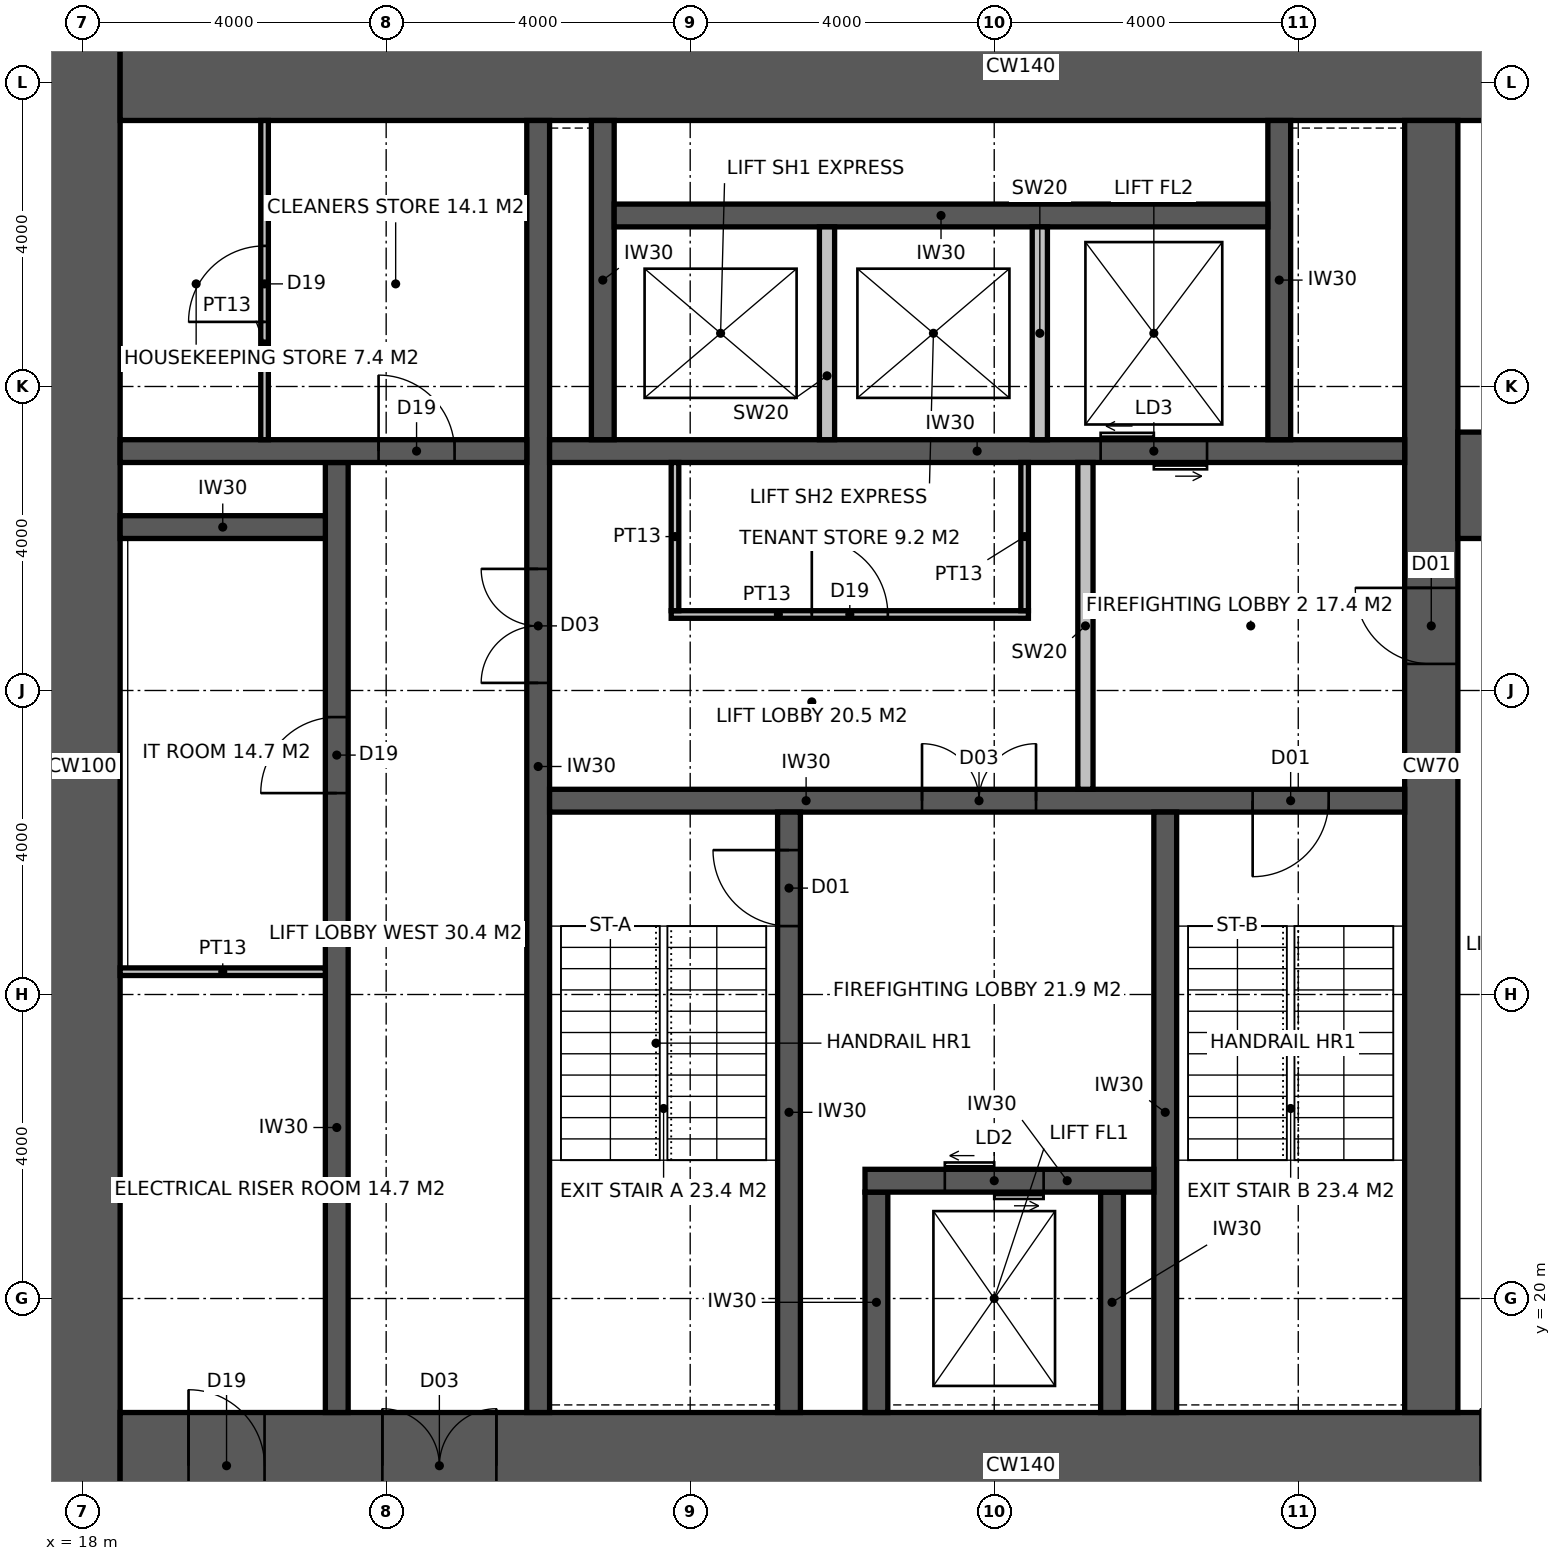
"""IFC4 building model, lengths in metres.
Left out: names, types, materials, properties, quantities, classifications, styles, units other than length and angle.
Written with IfcOpenShell. Run it as: python <this file> out.ifc"""

import sys

from ifc_helpers import new_model, si_unit, direction, frame, frame_2d, origin, place, context, subcontext, project, spatial, rectangle, extrude, element, fill, save


model = new_model("IFC4")
c1 = context("Model", 3, precision=1e-05, world=origin(), true_north=direction((0.0, 1.0)))
c2 = subcontext(c1, "Body", "Model", "MODEL_VIEW")
j1 = project(units=[si_unit("LENGTHUNIT", "METRE"), si_unit("PLANEANGLEUNIT", "RADIAN")], contexts=[c1])
p1 = place(None, origin())
s1 = spatial("IfcSite", under=j1, at=p1, CompositionType="ELEMENT")
p2 = place(p1, origin())
s2 = spatial("IfcBuilding", under=s1, at=p2, CompositionType="ELEMENT")
p3 = place(p2, frame((0.0, 0.0, 63.0)))
s3 = spatial("IfcBuildingStorey", under=s2, at=p3, CompositionType="ELEMENT", Elevation=63.0)
p4 = place(p3, frame((18.0, 17.1, -0.15), z_axis=(0.0, 0.0, 1.0), x_axis=(0.0, 1.0, 0.0)))
e1 = element("IfcWall", 1, at=p4, inside=s3, PredefinedType="SHEAR", context=c2, shape_type="SweptSolid", body=[
    extrude(rectangle(XDim=19.8, YDim=1.0, at=frame_2d((9.9, 0.0))), origin(), (0.0, 0.0, 1.0), 4.0),
])
p5 = place(p3, frame((18.5, 17.8, -0.15), z_axis=(0.0, 0.0, 1.0), x_axis=(1.0, 0.0, 0.0)))
e2 = element("IfcWall", 2, at=p5, inside=s3, PredefinedType="SHEAR", context=c2, shape_type="SweptSolid", body=[
    extrude(rectangle(XDim=23.7, YDim=1.4, at=frame_2d((11.85, 0.0))), origin(), (0.0, 0.0, 1.0), 4.0),
])
p6 = place(p5, frame((3.45, 0.0, 0.15)))
e3 = element("IfcOpeningElement", 3, at=p6, cuts=e2, PredefinedType="OPENING", context=c2, shape_type="SweptSolid", body=[
    extrude(rectangle(XDim=1.5, YDim=2.4, at=frame_2d((0.75, 1.2))), frame((0.0, 0.71, 0.0), z_axis=(0.0, -1.0, 0.0), x_axis=(1.0, 0.0, 0.0)), (0.0, 0.0, 1.0), 1.42),
])
p7 = place(p5, frame((17.9, 0.0, 0.15)))
e4 = element("IfcOpeningElement", 4, at=p7, cuts=e2, PredefinedType="OPENING", context=c2, shape_type="SweptSolid", body=[
    extrude(rectangle(XDim=1.5, YDim=2.4, at=frame_2d((0.75, 1.2))), frame((0.0, 0.71, 0.0), z_axis=(0.0, -1.0, 0.0), x_axis=(1.0, 0.0, 0.0)), (0.0, 0.0, 1.0), 1.42),
])
p8 = place(p5, frame((0.9, 0.0, 0.15)))
e5 = element("IfcOpeningElement", 5, at=p8, cuts=e2, PredefinedType="OPENING", context=c2, shape_type="SweptSolid", body=[
    extrude(rectangle(XDim=1.0, YDim=2.2, at=frame_2d((0.5, 1.1))), frame((0.0, 0.71, 0.0), z_axis=(0.0, -1.0, 0.0), x_axis=(1.0, 0.0, 0.0)), (0.0, 0.0, 1.0), 1.42),
])
p9 = place(p3, frame((18.5, 36.2, -0.15), z_axis=(0.0, 0.0, 1.0), x_axis=(1.0, 0.0, 0.0)))
e6 = element("IfcWall", 6, at=p9, inside=s3, PredefinedType="SHEAR", context=c2, shape_type="SweptSolid", body=[
    extrude(rectangle(XDim=23.7, YDim=1.4, at=frame_2d((11.85, 0.0))), origin(), (0.0, 0.0, 1.0), 4.0),
])
p10 = place(p3, frame((35.75, 18.5, -0.15), z_axis=(0.0, 0.0, 1.0), x_axis=(0.0, 1.0, 0.0)))
e7 = element("IfcWall", 7, at=p10, inside=s3, PredefinedType="SHEAR", context=c2, shape_type="SweptSolid", body=[
    extrude(rectangle(XDim=17.0, YDim=0.7, at=frame_2d((8.5, 0.0))), origin(), (0.0, 0.0, 1.0), 4.0),
])
p11 = place(p10, frame((9.85, 0.0, 0.15)))
e8 = element("IfcOpeningElement", 8, at=p11, cuts=e7, PredefinedType="OPENING", context=c2, shape_type="SweptSolid", body=[
    extrude(rectangle(XDim=1.0, YDim=2.2, at=frame_2d((0.5, 1.1))), frame((0.0, 0.36, 0.0), z_axis=(0.0, -1.0, 0.0), x_axis=(1.0, 0.0, 0.0)), (0.0, 0.0, 1.0), 0.72),
])
p12 = place(p3, frame((24.0, 18.5, -0.15), z_axis=(0.0, 0.0, 1.0), x_axis=(0.0, 1.0, 0.0)))
e9 = element("IfcWall", 9, at=p12, inside=s3, PredefinedType="SHEAR", context=c2, shape_type="SweptSolid", body=[
    extrude(rectangle(XDim=17.0, YDim=0.3, at=frame_2d((8.5, 0.0))), origin(), (0.0, 0.0, 1.0), 4.0),
])
p13 = place(p12, frame((9.6, 0.0, 0.15)))
e10 = element("IfcOpeningElement", 10, at=p13, cuts=e9, PredefinedType="OPENING", context=c2, shape_type="SweptSolid", body=[
    extrude(rectangle(XDim=1.5, YDim=2.4, at=frame_2d((0.75, 1.2))), frame((0.0, 0.16, 0.0), z_axis=(0.0, -1.0, 0.0), x_axis=(1.0, 0.0, 0.0)), (0.0, 0.0, 1.0), 0.32),
])
p14 = place(p3, frame((24.15, 26.55, -0.15), z_axis=(0.0, 0.0, 1.0), x_axis=(1.0, 0.0, 0.0)))
e11 = element("IfcWall", 11, at=p14, inside=s3, PredefinedType="SHEAR", context=c2, shape_type="SweptSolid", body=[
    extrude(rectangle(XDim=11.25, YDim=0.3, at=frame_2d((5.625, 0.0))), origin(), (0.0, 0.0, 1.0), 4.0),
])
p15 = place(p14, frame((9.25, 0.0, 0.15)))
e12 = element("IfcOpeningElement", 12, at=p15, cuts=e11, PredefinedType="OPENING", context=c2, shape_type="SweptSolid", body=[
    extrude(rectangle(XDim=1.0, YDim=2.2, at=frame_2d((0.5, 1.1))), frame((0.0, 0.16, 0.0), z_axis=(0.0, -1.0, 0.0), x_axis=(1.0, 0.0, 0.0)), (0.0, 0.0, 1.0), 0.32),
])
p16 = place(p14, frame((4.9, 0.0, 0.15)))
e13 = element("IfcOpeningElement", 13, at=p16, cuts=e11, PredefinedType="OPENING", context=c2, shape_type="SweptSolid", body=[
    extrude(rectangle(XDim=1.5, YDim=2.4, at=frame_2d((0.75, 1.2))), frame((0.0, 0.16, 0.0), z_axis=(0.0, -1.0, 0.0), x_axis=(1.0, 0.0, 0.0)), (0.0, 0.0, 1.0), 0.32),
])
p17 = place(p3, frame((27.3, 18.5, -0.15), z_axis=(0.0, 0.0, 1.0), x_axis=(0.0, 1.0, 0.0)))
e14 = element("IfcWall", 14, at=p17, inside=s3, PredefinedType="SHEAR", context=c2, shape_type="SweptSolid", body=[
    extrude(rectangle(XDim=7.9, YDim=0.3, at=frame_2d((3.95, 0.0))), origin(), (0.0, 0.0, 1.0), 4.0),
])
p18 = place(p17, frame((6.4, 0.0, 0.15)))
e15 = element("IfcOpeningElement", 15, at=p18, cuts=e14, PredefinedType="OPENING", context=c2, shape_type="SweptSolid", body=[
    extrude(rectangle(XDim=1.0, YDim=2.2, at=frame_2d((0.5, 1.1))), frame((0.0, 0.16, 0.0), z_axis=(0.0, -1.0, 0.0), x_axis=(1.0, 0.0, 0.0)), (0.0, 0.0, 1.0), 0.32),
])
p19 = place(p3, frame((32.25, 18.5, -0.15), z_axis=(0.0, 0.0, 1.0), x_axis=(0.0, 1.0, 0.0)))
e16 = element("IfcWall", 16, at=p19, inside=s3, PredefinedType="SHEAR", context=c2, shape_type="SweptSolid", body=[
    extrude(rectangle(XDim=7.9, YDim=0.3, at=frame_2d((3.95, 0.0))), origin(), (0.0, 0.0, 1.0), 4.0),
])
for number, where, z_axis, x_axis in (
    (17, (28.45, 18.5, -0.15), (0.0, 0.0, 1.0), (0.0, 1.0, 0.0)),
    (18, (31.55, 18.5, -0.15), (0.0, 0.0, 1.0), (0.0, 1.0, 0.0)),
):
    element("IfcWall", number, at=place(p3, frame(where, z_axis=z_axis, x_axis=x_axis)), inside=s3, PredefinedType="SHEAR", context=c2, shape_type="SweptSolid", body=[
        extrude(rectangle(XDim=2.9, YDim=0.3, at=frame_2d((1.45, 0.0))), origin(), (0.0, 0.0, 1.0), 4.0),
    ])
p20 = place(p3, frame((28.3, 21.55, -0.15), z_axis=(0.0, 0.0, 1.0), x_axis=(1.0, 0.0, 0.0)))
e19 = element("IfcWall", 19, at=p20, inside=s3, PredefinedType="SHEAR", context=c2, shape_type="SweptSolid", body=[
    extrude(rectangle(XDim=3.8, YDim=0.3, at=frame_2d((1.9, 0.0))), origin(), (0.0, 0.0, 1.0), 4.0),
])
p21 = place(p20, frame((1.05, 0.0, 0.15)))
e20 = element("IfcOpeningElement", 20, at=p21, cuts=e19, PredefinedType="OPENING", context=c2, shape_type="SweptSolid", body=[
    extrude(rectangle(XDim=1.3, YDim=2.4, at=frame_2d((0.65, 1.2))), frame((0.0, 0.16, 0.0), z_axis=(0.0, -1.0, 0.0), x_axis=(1.0, 0.0, 0.0)), (0.0, 0.0, 1.0), 0.32),
])
p22 = place(p3, frame((24.15, 31.15, -0.15), z_axis=(0.0, 0.0, 1.0), x_axis=(1.0, 0.0, 0.0)))
e21 = element("IfcWall", 21, at=p22, inside=s3, PredefinedType="SHEAR", context=c2, shape_type="SweptSolid", body=[
    extrude(rectangle(XDim=11.25, YDim=0.3, at=frame_2d((5.625, 0.0))), origin(), (0.0, 0.0, 1.0), 4.0),
])
p23 = place(p22, frame((7.25, 0.0, 0.15)))
e22 = element("IfcOpeningElement", 22, at=p23, cuts=e21, PredefinedType="OPENING", context=c2, shape_type="SweptSolid", body=[
    extrude(rectangle(XDim=1.4, YDim=2.4, at=frame_2d((0.7, 1.2))), frame((0.0, 0.16, 0.0), z_axis=(0.0, -1.0, 0.0), x_axis=(1.0, 0.0, 0.0)), (0.0, 0.0, 1.0), 0.32),
])
p24 = place(p3, frame((21.35, 18.5, -0.15), z_axis=(0.0, 0.0, 1.0), x_axis=(0.0, 1.0, 0.0)))
e23 = element("IfcWall", 23, at=p24, inside=s3, PredefinedType="SHEAR", context=c2, shape_type="SweptSolid", body=[
    extrude(rectangle(XDim=12.5, YDim=0.3, at=frame_2d((6.25, 0.0))), origin(), (0.0, 0.0, 1.0), 4.0),
])
p25 = place(p24, frame((8.15, 0.0, 0.15)))
e24 = element("IfcOpeningElement", 24, at=p25, cuts=e23, PredefinedType="OPENING", context=c2, shape_type="SweptSolid", body=[
    extrude(rectangle(XDim=1.0, YDim=2.2, at=frame_2d((0.5, 1.1))), frame((0.0, 0.16, 0.0), z_axis=(0.0, -1.0, 0.0), x_axis=(1.0, 0.0, 0.0)), (0.0, 0.0, 1.0), 0.32),
])
p26 = place(p3, frame((18.5, 31.15, -0.15), z_axis=(0.0, 0.0, 1.0), x_axis=(1.0, 0.0, 0.0)))
e25 = element("IfcWall", 25, at=p26, inside=s3, PredefinedType="SHEAR", context=c2, shape_type="SweptSolid", body=[
    extrude(rectangle(XDim=5.35, YDim=0.3, at=frame_2d((2.675, 0.0))), origin(), (0.0, 0.0, 1.0), 4.0),
])
p27 = place(p26, frame((3.4, 0.0, 0.15)))
e26 = element("IfcOpeningElement", 26, at=p27, cuts=e25, PredefinedType="OPENING", context=c2, shape_type="SweptSolid", body=[
    extrude(rectangle(XDim=1.0, YDim=2.2, at=frame_2d((0.5, 1.1))), frame((0.0, 0.16, 0.0), z_axis=(0.0, -1.0, 0.0), x_axis=(1.0, 0.0, 0.0)), (0.0, 0.0, 1.0), 0.32),
])
p28 = place(p3, frame((18.5, 30.15, -0.15), z_axis=(0.0, 0.0, 1.0), x_axis=(1.0, 0.0, 0.0)))
e27 = element("IfcWall", 27, at=p28, inside=s3, PredefinedType="SHEAR", context=c2, shape_type="SweptSolid", body=[
    extrude(rectangle(XDim=2.7, YDim=0.3, at=frame_2d((1.35, 0.0))), origin(), (0.0, 0.0, 1.0), 4.0),
])
for number, where, z_axis, x_axis in (
    (28, (24.85, 31.3, -0.15), (0.0, 0.0, 1.0), (0.0, 1.0, 0.0)),
    (29, (33.75, 31.3, -0.15), (0.0, 0.0, 1.0), (0.0, 1.0, 0.0)),
):
    element("IfcWall", number, at=place(p3, frame(where, z_axis=z_axis, x_axis=x_axis)), inside=s3, PredefinedType="SHEAR", context=c2, shape_type="SweptSolid", body=[
        extrude(rectangle(XDim=4.2, YDim=0.3, at=frame_2d((2.1, 0.0))), origin(), (0.0, 0.0, 1.0), 4.0),
    ])
p29 = place(p3, frame((25.0, 34.25, -0.15), z_axis=(0.0, 0.0, 1.0), x_axis=(1.0, 0.0, 0.0)))
e30 = element("IfcWall", 30, at=p29, inside=s3, PredefinedType="SHEAR", context=c2, shape_type="SweptSolid", body=[
    extrude(rectangle(XDim=8.6, YDim=0.3, at=frame_2d((4.3, 0.0))), origin(), (0.0, 0.0, 1.0), 4.0),
])
for number, where, z_axis, x_axis in (
    (31, (27.8, 31.3, -0.15), (0.0, 0.0, 1.0), (0.0, 1.0, 0.0)),
    (32, (30.6, 31.3, -0.15), (0.0, 0.0, 1.0), (0.0, 1.0, 0.0)),
):
    element("IfcWall", number, at=place(p3, frame(where, z_axis=z_axis, x_axis=x_axis)), inside=s3, PredefinedType="SOLIDWALL", context=c2, shape_type="SweptSolid", body=[
        extrude(rectangle(XDim=2.8, YDim=0.2, at=frame_2d((1.4, 0.0))), origin(), (0.0, 0.0, 1.0), 4.0),
    ])
p30 = place(p3, frame((36.1, 30.7, -0.15), z_axis=(0.0, 0.0, 1.0), x_axis=(1.0, 0.0, 0.0)))
e33 = element("IfcWall", 33, at=p30, inside=s3, PredefinedType="SHEAR", context=c2, shape_type="SweptSolid", body=[
    extrude(rectangle(XDim=6.1, YDim=1.4, at=frame_2d((3.05, 0.0))), origin(), (0.0, 0.0, 1.0), 4.0),
])
p31 = place(p30, frame((0.6, 0.0, 0.15)))
e34 = element("IfcOpeningElement", 34, at=p31, cuts=e33, PredefinedType="OPENING", context=c2, shape_type="SweptSolid", body=[
    extrude(rectangle(XDim=1.0, YDim=2.2, at=frame_2d((0.5, 1.1))), frame((0.0, 0.71, 0.0), z_axis=(0.0, -1.0, 0.0), x_axis=(1.0, 0.0, 0.0)), (0.0, 0.0, 1.0), 1.42),
])
p32 = place(p3, frame((31.2, 26.7, 0.0), z_axis=(0.0, 0.0, 1.0), x_axis=(0.0, 1.0, 0.0)))
e35 = element("IfcWall", 35, at=p32, inside=s3, PredefinedType="SOLIDWALL", context=c2, shape_type="SweptSolid", body=[
    extrude(rectangle(XDim=4.3, YDim=0.2, at=frame_2d((2.15, 0.0))), origin(), (0.0, 0.0, 1.0), 3.85),
])
p33 = place(p3, frame((20.4, 31.3, 0.0), z_axis=(0.0, 0.0, 1.0), x_axis=(0.0, 1.0, 0.0)))
e36 = element("IfcWall", 36, at=p33, inside=s3, PredefinedType="PARTITIONING", context=c2, shape_type="SweptSolid", body=[
    extrude(rectangle(XDim=4.2, YDim=0.1, at=frame_2d((2.1, 0.0))), origin(), (0.0, 0.0, 1.0), 3.85),
])
p34 = place(p33, frame((1.55, 0.0, 0.0)))
e37 = element("IfcOpeningElement", 37, at=p34, cuts=e36, PredefinedType="OPENING", context=c2, shape_type="SweptSolid", body=[
    extrude(rectangle(XDim=1.0, YDim=2.2, at=frame_2d((0.5, 1.1))), frame((0.0, 0.06, 0.0), z_axis=(0.0, -1.0, 0.0), x_axis=(1.0, 0.0, 0.0)), (0.0, 0.0, 1.0), 0.12),
])
p35 = place(p3, frame((25.75, 29.0, 0.0), z_axis=(0.0, 0.0, 1.0), x_axis=(1.0, 0.0, 0.0)))
e38 = element("IfcWall", 38, at=p35, inside=s3, PredefinedType="PARTITIONING", context=c2, shape_type="SweptSolid", body=[
    extrude(rectangle(XDim=4.7, YDim=0.1, at=frame_2d((2.35, 0.0))), origin(), (0.0, 0.0, 1.0), 3.85),
])
p36 = place(p35, frame((1.85, 0.0, 0.0)))
e39 = element("IfcOpeningElement", 39, at=p36, cuts=e38, PredefinedType="OPENING", context=c2, shape_type="SweptSolid", body=[
    extrude(rectangle(XDim=1.0, YDim=2.2, at=frame_2d((0.5, 1.1))), frame((0.0, 0.06, 0.0), z_axis=(0.0, -1.0, 0.0), x_axis=(1.0, 0.0, 0.0)), (0.0, 0.0, 1.0), 0.12),
])
for number, where, z_axis, x_axis in (
    (40, (25.8, 29.05, 0.0), (0.0, 0.0, 1.0), (0.0, 1.0, 0.0)),
    (41, (30.4, 29.05, 0.0), (0.0, 0.0, 1.0), (0.0, 1.0, 0.0)),
):
    element("IfcWall", number, at=place(p3, frame(where, z_axis=z_axis, x_axis=x_axis)), inside=s3, PredefinedType="PARTITIONING", context=c2, shape_type="SweptSolid", body=[
        extrude(rectangle(XDim=1.95, YDim=0.1, at=frame_2d((0.975, 0.0))), origin(), (0.0, 0.0, 1.0), 3.85),
    ])
p37 = place(p3, frame((18.5, 24.3, 0.0), z_axis=(0.0, 0.0, 1.0), x_axis=(1.0, 0.0, 0.0)))
e42 = element("IfcWall", 42, at=p37, inside=s3, PredefinedType="PARTITIONING", context=c2, shape_type="SweptSolid", body=[
    extrude(rectangle(XDim=2.7, YDim=0.1, at=frame_2d((1.35, 0.0))), origin(), (0.0, 0.0, 1.0), 3.85),
])
p38 = place(p18, origin())
e43 = element("IfcDoor", 43, at=p38, inside=s3, OperationType="SINGLE_SWING_RIGHT", PredefinedType="DOOR", context=c2, shape_type="SweptSolid", body=[
    extrude(rectangle(XDim=1.0, YDim=2.2, at=frame_2d((0.5, 1.1))), frame((0.0, 0.025, 0.0), z_axis=(0.0, -1.0, 0.0), x_axis=(1.0, 0.0, 0.0)), (0.0, 0.0, 1.0), 0.05),
])
fill(e15, e43)
p39 = place(p15, frame((1.0, 0.0, 0.0), z_axis=(0.0, 0.0, 1.0), x_axis=(-1.0, 0.0, 0.0)))
e44 = element("IfcDoor", 44, at=p39, inside=s3, OperationType="SINGLE_SWING_RIGHT", PredefinedType="DOOR", context=c2, shape_type="SweptSolid", body=[
    extrude(rectangle(XDim=1.0, YDim=2.2, at=frame_2d((0.5, 1.1))), frame((0.0, 0.025, 0.0), z_axis=(0.0, -1.0, 0.0), x_axis=(1.0, 0.0, 0.0)), (0.0, 0.0, 1.0), 0.05),
])
fill(e12, e44)
p40 = place(p11, origin())
e45 = element("IfcDoor", 45, at=p40, inside=s3, OperationType="SINGLE_SWING_RIGHT", PredefinedType="DOOR", context=c2, shape_type="SweptSolid", body=[
    extrude(rectangle(XDim=1.0, YDim=2.2, at=frame_2d((0.5, 1.1))), frame((0.0, 0.025, 0.0), z_axis=(0.0, -1.0, 0.0), x_axis=(1.0, 0.0, 0.0)), (0.0, 0.0, 1.0), 0.05),
])
fill(e8, e45)
p41 = place(p16, origin())
e46 = element("IfcDoor", 46, at=p41, inside=s3, OperationType="DOUBLE_DOOR_DOUBLE_SWING", PredefinedType="DOOR", context=c2, shape_type="SweptSolid", body=[
    extrude(rectangle(XDim=1.5, YDim=2.4, at=frame_2d((0.75, 1.2))), frame((0.0, 0.025, 0.0), z_axis=(0.0, -1.0, 0.0), x_axis=(1.0, 0.0, 0.0)), (0.0, 0.0, 1.0), 0.05),
])
fill(e13, e46)
p42 = place(p13, origin())
e47 = element("IfcDoor", 47, at=p42, inside=s3, OperationType="DOUBLE_DOOR_DOUBLE_SWING", PredefinedType="DOOR", context=c2, shape_type="SweptSolid", body=[
    extrude(rectangle(XDim=1.5, YDim=2.4, at=frame_2d((0.75, 1.2))), frame((0.0, 0.025, 0.0), z_axis=(0.0, -1.0, 0.0), x_axis=(1.0, 0.0, 0.0)), (0.0, 0.0, 1.0), 0.05),
])
fill(e10, e47)
p43 = place(p27, origin())
e48 = element("IfcDoor", 48, at=p43, inside=s3, OperationType="SINGLE_SWING_LEFT", PredefinedType="DOOR", context=c2, shape_type="SweptSolid", body=[
    extrude(rectangle(XDim=1.0, YDim=2.2, at=frame_2d((0.5, 1.1))), frame((0.0, 0.025, 0.0), z_axis=(0.0, -1.0, 0.0), x_axis=(1.0, 0.0, 0.0)), (0.0, 0.0, 1.0), 0.05),
])
fill(e26, e48)
p44 = place(p34, origin())
e49 = element("IfcDoor", 49, at=p44, inside=s3, OperationType="SINGLE_SWING_LEFT", PredefinedType="DOOR", context=c2, shape_type="SweptSolid", body=[
    extrude(rectangle(XDim=1.0, YDim=2.2, at=frame_2d((0.5, 1.1))), frame((0.0, 0.025, 0.0), z_axis=(0.0, -1.0, 0.0), x_axis=(1.0, 0.0, 0.0)), (0.0, 0.0, 1.0), 0.05),
])
fill(e37, e49)
p45 = place(p36, origin())
e50 = element("IfcDoor", 50, at=p45, inside=s3, OperationType="SINGLE_SWING_LEFT", PredefinedType="DOOR", context=c2, shape_type="SweptSolid", body=[
    extrude(rectangle(XDim=1.0, YDim=2.2, at=frame_2d((0.5, 1.1))), frame((0.0, 0.025, 0.0), z_axis=(0.0, -1.0, 0.0), x_axis=(1.0, 0.0, 0.0)), (0.0, 0.0, 1.0), 0.05),
])
fill(e39, e50)
p46 = place(p25, origin())
e51 = element("IfcDoor", 51, at=p46, inside=s3, OperationType="SINGLE_SWING_LEFT", PredefinedType="DOOR", context=c2, shape_type="SweptSolid", body=[
    extrude(rectangle(XDim=1.0, YDim=2.2, at=frame_2d((0.5, 1.1))), frame((0.0, 0.025, 0.0), z_axis=(0.0, -1.0, 0.0), x_axis=(1.0, 0.0, 0.0)), (0.0, 0.0, 1.0), 0.05),
])
fill(e24, e51)
p47 = place(p6, origin())
e52 = element("IfcDoor", 52, at=p47, inside=s3, OperationType="DOUBLE_DOOR_DOUBLE_SWING", PredefinedType="DOOR", context=c2, shape_type="SweptSolid", body=[
    extrude(rectangle(XDim=1.5, YDim=2.4, at=frame_2d((0.75, 1.2))), frame((0.0, 0.025, 0.0), z_axis=(0.0, -1.0, 0.0), x_axis=(1.0, 0.0, 0.0)), (0.0, 0.0, 1.0), 0.05),
])
fill(e3, e52)
p48 = place(p8, origin())
e53 = element("IfcDoor", 53, at=p48, inside=s3, OperationType="SINGLE_SWING_LEFT", PredefinedType="DOOR", context=c2, shape_type="SweptSolid", body=[
    extrude(rectangle(XDim=1.0, YDim=2.2, at=frame_2d((0.5, 1.1))), frame((0.0, 0.025, 0.0), z_axis=(0.0, -1.0, 0.0), x_axis=(1.0, 0.0, 0.0)), (0.0, 0.0, 1.0), 0.05),
])
fill(e5, e53)
p49 = place(p21, origin())
e54 = element("IfcDoor", 54, at=p49, inside=s3, OperationType="DOUBLE_DOOR_SLIDING", PredefinedType="DOOR", context=c2, shape_type="SweptSolid", body=[
    extrude(rectangle(XDim=1.3, YDim=2.4, at=frame_2d((0.65, 1.2))), frame((0.0, 0.025, 0.0), z_axis=(0.0, -1.0, 0.0), x_axis=(1.0, 0.0, 0.0)), (0.0, 0.0, 1.0), 0.05),
])
fill(e20, e54)
p50 = place(p23, origin())
e55 = element("IfcDoor", 55, at=p50, inside=s3, OperationType="DOUBLE_DOOR_SLIDING", PredefinedType="DOOR", context=c2, shape_type="SweptSolid", body=[
    extrude(rectangle(XDim=1.4, YDim=2.4, at=frame_2d((0.7, 1.2))), frame((0.0, 0.025, 0.0), z_axis=(0.0, -1.0, 0.0), x_axis=(1.0, 0.0, 0.0)), (0.0, 0.0, 1.0), 0.05),
])
fill(e22, e55)
save(model, sys.argv[1])
